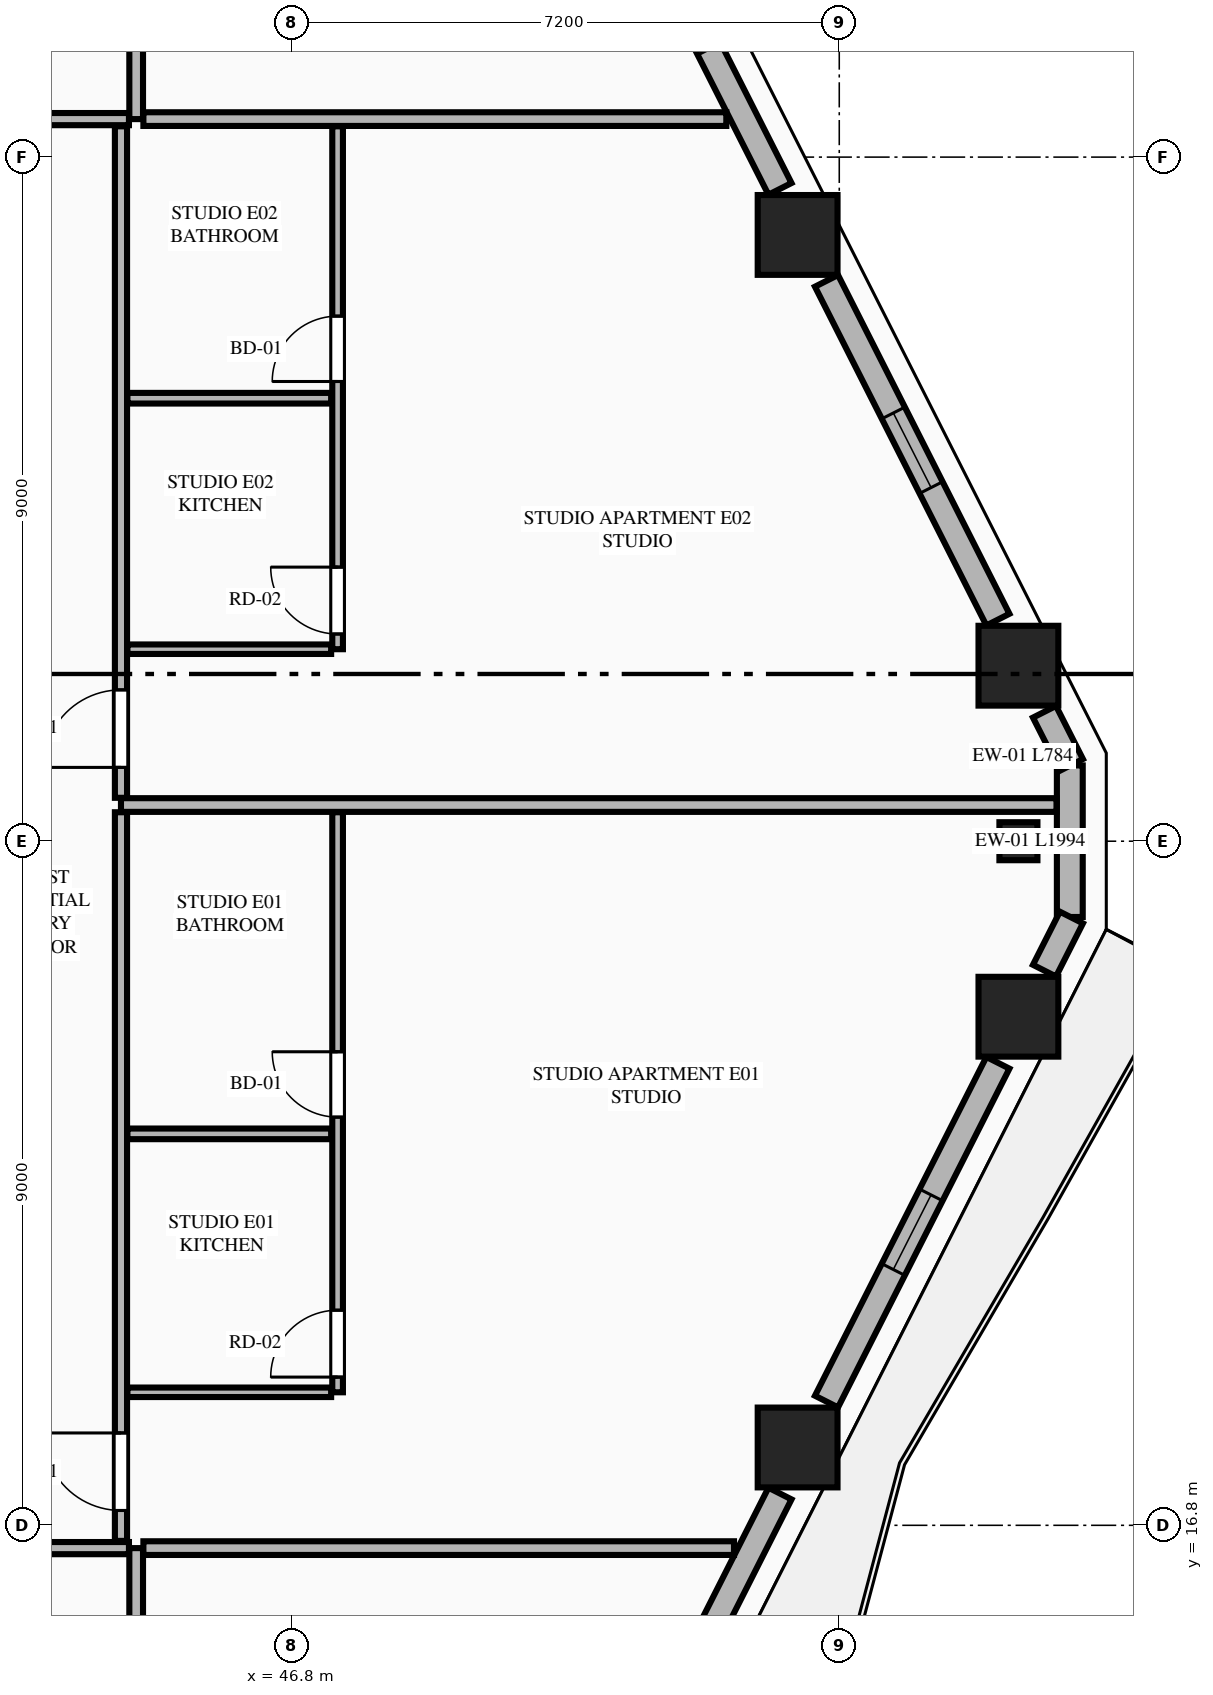
"""IFC4 building model, lengths in metres.
Left out: names, types, materials, properties, quantities, classifications, styles, units other than length and angle.
Written with IfcOpenShell. Run it as: python <this file> out.ifc"""

import sys

from ifc_helpers import new_model, si_unit, direction, frame, frame_2d, origin, origin_2d, place, context, subcontext, project, spatial, rectangle, extrude, element, fill, save


model = new_model("IFC4")
c1 = context("Model", 3, precision=1e-05, world=origin(), true_north=direction((0.0, 1.0)))
c2 = subcontext(c1, "Body", "Model", "MODEL_VIEW")
j1 = project(units=[si_unit("LENGTHUNIT", "METRE"), si_unit("PLANEANGLEUNIT", "RADIAN")], contexts=[c1])
p1 = place(None, origin())
s1 = spatial("IfcSite", under=j1, at=p1, CompositionType="ELEMENT")
p2 = place(p1, origin())
s2 = spatial("IfcBuilding", under=s1, at=p2, CompositionType="ELEMENT")
p3 = place(p2, frame((0.0, 0.0, 119.7)))
s3 = spatial("IfcBuildingStorey", under=s2, at=p3, CompositionType="ELEMENT", Elevation=119.7)
for number, where, z_axis, x_axis in (
    (1, (53.452, 17.824, 0.0), (0.0, 0.0, 1.0), (1.0, 0.0, 0.0)),
    (2, (56.357, 23.491, 0.0), (0.0, 0.0, 1.0), (1.0, 0.0, 0.0)),
    (3, (56.357, 28.109, 0.0), (0.0, 0.0, 1.0), (1.0, 0.0, 0.0)),
    (4, (53.452, 33.776, 0.0), (0.0, 0.0, 1.0), (1.0, 0.0, 0.0)),
):
    element("IfcColumn", number, at=place(p3, frame(where, z_axis=z_axis, x_axis=x_axis)), inside=s3, PredefinedType="COLUMN", context=c2, shape_type="SweptSolid", body=[
        extrude(rectangle(XDim=1.05, YDim=1.05, at=origin_2d()), origin(), (0.0, 0.0, 1.0), 3.55),
    ])
p4 = place(p3, frame((56.357, 25.8, 0.0), z_axis=(0.0, 0.0, 1.0), x_axis=(0.0, 1.0, 0.0)))
e5 = element("IfcColumn", 5, at=p4, inside=s3, PredefinedType="PILASTER", context=c2, shape_type="SweptSolid", body=[
    extrude(rectangle(XDim=0.5, YDim=0.35, at=origin_2d()), origin(), (0.0, 0.0, 1.0), 3.55),
])
p5 = place(p3, frame((57.033, 24.803, 0.0), z_axis=(0.0, 0.0, 1.0), x_axis=(0.0, 1.0, 0.0)))
e6 = element("IfcWall", 6, at=p5, inside=s3, PredefinedType="STANDARD", context=c2, shape_type="SweptSolid", body=[
    extrude(rectangle(XDim=1.994, YDim=0.34, at=frame_2d((0.997, 0.0))), origin(), (0.0, 0.0, 1.0), 3.34),
])
p6 = place(p3, frame((50.863, 12.561, 0.0), z_axis=(0.0, 0.0, 1.0), x_axis=(0.451567731634, 0.892236842855, 0.0)))
e7 = element("IfcWall", 7, at=p6, inside=s3, PredefinedType="STANDARD", context=c2, shape_type="SweptSolid", body=[
    extrude(rectangle(XDim=5.219, YDim=0.34, at=frame_2d((2.61, 0.0))), origin(), (0.0, 0.0, 1.0), 2.797),
])
p7 = place(p6, frame((1.532, 0.0, 0.0)))
e8 = element("IfcOpeningElement", 8, at=p7, cuts=e7, PredefinedType="OPENING", context=c2, shape_type="SweptSolid", body=[
    extrude(rectangle(XDim=1.1, YDim=2.25, at=frame_2d((0.55, 1.125))), frame((0.0, 0.18, 0.0), z_axis=(0.0, -1.0, 0.0), x_axis=(1.0, 0.0, 0.0)), (0.0, 0.0, 1.0), 0.36),
])
p8 = place(p3, frame((53.832, 18.428, 0.0), z_axis=(0.0, 0.0, 1.0), x_axis=(0.451431617681, 0.892305718102, 0.0)))
e9 = element("IfcWall", 9, at=p8, inside=s3, PredefinedType="STANDARD", context=c2, shape_type="SweptSolid", body=[
    extrude(rectangle(XDim=4.995, YDim=0.34, at=frame_2d((2.498, 0.0))), origin(), (0.0, 0.0, 1.0), 2.797),
])
p9 = place(p8, frame((1.947, 0.0, 0.75)))
e10 = element("IfcOpeningElement", 10, at=p9, cuts=e9, PredefinedType="OPENING", context=c2, shape_type="SweptSolid", body=[
    extrude(rectangle(XDim=1.1, YDim=1.897, at=frame_2d((0.55, 0.948))), frame((0.0, 0.18, 0.0), z_axis=(0.0, -1.0, 0.0), x_axis=(1.0, 0.0, 0.0)), (0.0, 0.0, 1.0), 0.36),
])
for number, where, z_axis, x_axis in (
    (11, (56.7, 24.097, 0.0), (0.0, 0.0, 1.0), (0.452, 0.892, 0.0)),
    (12, (57.054, 26.804, 0.0), (0.0, 0.0, 1.0), (-0.452, 0.892, 0.0)),
):
    element("IfcWall", number, at=place(p3, frame(where, z_axis=z_axis, x_axis=x_axis)), inside=s3, PredefinedType="STANDARD", context=c2, shape_type="SweptSolid", body=[
        extrude(rectangle(XDim=0.783, YDim=0.34, at=frame_2d((0.392, 0.0))), origin(), (0.0, 0.0, 1.0), 3.34),
    ])
p10 = place(p3, frame((56.087, 28.715, 0.0), z_axis=(0.0, 0.0, 1.0), x_axis=(-0.451431617681, 0.892305718102, 0.0)))
e13 = element("IfcWall", 13, at=p10, inside=s3, PredefinedType="STANDARD", context=c2, shape_type="SweptSolid", body=[
    extrude(rectangle(XDim=4.995, YDim=0.34, at=frame_2d((2.498, 0.0))), origin(), (0.0, 0.0, 1.0), 2.797),
])
p11 = place(p10, frame((1.947, 0.0, 0.75)))
e14 = element("IfcOpeningElement", 14, at=p11, cuts=e13, PredefinedType="OPENING", context=c2, shape_type="SweptSolid", body=[
    extrude(rectangle(XDim=1.1, YDim=1.897, at=frame_2d((0.55, 0.948))), frame((0.0, 0.18, 0.0), z_axis=(0.0, -1.0, 0.0), x_axis=(1.0, 0.0, 0.0)), (0.0, 0.0, 1.0), 0.36),
])
p12 = place(p3, frame((53.22, 34.382, 0.0), z_axis=(0.0, 0.0, 1.0), x_axis=(-0.451567731634, 0.892236842855, 0.0)))
e15 = element("IfcWall", 15, at=p12, inside=s3, PredefinedType="STANDARD", context=c2, shape_type="SweptSolid", body=[
    extrude(rectangle(XDim=5.219, YDim=0.34, at=frame_2d((2.61, 0.0))), origin(), (0.0, 0.0, 1.0), 2.797),
])
p13 = place(p12, frame((2.06, 0.0, 0.75)))
e16 = element("IfcOpeningElement", 16, at=p13, cuts=e15, PredefinedType="OPENING", context=c2, shape_type="SweptSolid", body=[
    extrude(rectangle(XDim=1.1, YDim=1.897, at=frame_2d((0.55, 0.948))), frame((0.0, 0.18, 0.0), z_axis=(0.0, -1.0, 0.0), x_axis=(1.0, 0.0, 0.0)), (0.0, 0.0, 1.0), 0.36),
])
p14 = place(p3, frame((44.75, 4.105, 0.0), z_axis=(0.0, 0.0, 1.0), x_axis=(0.0, 1.0, 0.0)))
e17 = element("IfcWall", 17, at=p14, inside=s3, PredefinedType="PARTITIONING", context=c2, shape_type="SweptSolid", body=[
    extrude(rectangle(XDim=12.395, YDim=0.18, at=frame_2d((6.198, 0.0))), origin(), (0.0, 0.0, 1.0), 3.34),
])
p15 = place(p3, frame((20.145, 16.5, 0.0), z_axis=(0.0, 0.0, 1.0), x_axis=(1.0, 0.0, 0.0)))
e18 = element("IfcWall", 18, at=p15, inside=s3, PredefinedType="PARTITIONING", context=c2, shape_type="SweptSolid", body=[
    extrude(rectangle(XDim=24.51, YDim=0.16, at=frame_2d((12.255, 0.0))), origin(), (0.0, 0.0, 1.0), 3.34),
])
p16 = place(p15, frame((0.405, 0.0, 0.0)))
e19 = element("IfcOpeningElement", 19, at=p16, cuts=e18, PredefinedType="OPENING", context=c2, shape_type="SweptSolid", body=[
    extrude(rectangle(XDim=1.35, YDim=2.35, at=frame_2d((0.675, 1.175))), frame((0.0, 0.09, 0.0), z_axis=(0.0, -1.0, 0.0), x_axis=(1.0, 0.0, 0.0)), (0.0, 0.0, 1.0), 0.18),
])
p17 = place(p3, frame((44.75, 35.3, 0.0), z_axis=(0.0, 0.0, 1.0), x_axis=(0.0, 1.0, 0.0)))
e20 = element("IfcWall", 20, at=p17, inside=s3, PredefinedType="PARTITIONING", context=c2, shape_type="SweptSolid", body=[
    extrude(rectangle(XDim=12.195, YDim=0.18, at=frame_2d((6.098, 0.0))), origin(), (0.0, 0.0, 1.0), 3.34),
])
p18 = place(p3, frame((20.145, 35.3, 0.0), z_axis=(0.0, 0.0, 1.0), x_axis=(1.0, 0.0, 0.0)))
e21 = element("IfcWall", 21, at=p18, inside=s3, PredefinedType="PARTITIONING", context=c2, shape_type="SweptSolid", body=[
    extrude(rectangle(XDim=24.51, YDim=0.16, at=frame_2d((12.255, 0.0))), origin(), (0.0, 0.0, 1.0), 3.34),
])
p19 = place(p18, frame((0.405, 0.0, 0.0)))
e22 = element("IfcOpeningElement", 22, at=p19, cuts=e21, PredefinedType="OPENING", context=c2, shape_type="SweptSolid", body=[
    extrude(rectangle(XDim=1.02, YDim=2.25, at=frame_2d((0.51, 1.125))), frame((0.0, 0.09, 0.0), z_axis=(0.0, -1.0, 0.0), x_axis=(1.0, 0.0, 0.0)), (0.0, 0.0, 1.0), 0.18),
])
p20 = place(p3, frame((44.845, 16.5, 0.0), z_axis=(0.0, 0.0, 1.0), x_axis=(1.0, 0.0, 0.0)))
e23 = element("IfcWall", 23, at=p20, inside=s3, PredefinedType="PARTITIONING", context=c2, shape_type="SweptSolid", body=[
    extrude(rectangle(XDim=7.77, YDim=0.18, at=frame_2d((3.885, 0.0))), origin(), (0.0, 0.0, 1.0), 3.34),
])
p21 = place(p3, frame((44.845, 35.3, 0.0), z_axis=(0.0, 0.0, 1.0), x_axis=(1.0, 0.0, 0.0)))
e24 = element("IfcWall", 24, at=p21, inside=s3, PredefinedType="PARTITIONING", context=c2, shape_type="SweptSolid", body=[
    extrude(rectangle(XDim=7.669, YDim=0.18, at=frame_2d((3.834, 0.0))), origin(), (0.0, 0.0, 1.0), 3.34),
])
p22 = place(p3, frame((44.55, 16.595, 0.0), z_axis=(0.0, 0.0, 1.0), x_axis=(0.0, 1.0, 0.0)))
e25 = element("IfcWall", 25, at=p22, inside=s3, PredefinedType="PARTITIONING", context=c2, shape_type="SweptSolid", body=[
    extrude(rectangle(XDim=9.586, YDim=0.16, at=frame_2d((4.793, 0.0))), origin(), (0.0, 0.0, 1.0), 3.34),
])
p23 = place(p22, frame((0.4, 0.0, 0.0)))
e26 = element("IfcOpeningElement", 26, at=p23, cuts=e25, PredefinedType="OPENING", context=c2, shape_type="SweptSolid", body=[
    extrude(rectangle(XDim=1.02, YDim=2.25, at=frame_2d((0.51, 1.125))), frame((0.0, 0.09, 0.0), z_axis=(0.0, -1.0, 0.0), x_axis=(1.0, 0.0, 0.0)), (0.0, 0.0, 1.0), 0.18),
])
p24 = place(p3, frame((44.635, 18.55, 0.0), z_axis=(0.0, 0.0, 1.0), x_axis=(1.0, 0.0, 0.0)))
e27 = element("IfcWall", 27, at=p24, inside=s3, PredefinedType="PARTITIONING", context=c2, shape_type="SweptSolid", body=[
    extrude(rectangle(XDim=2.68, YDim=0.125, at=frame_2d((1.34, 0.0))), origin(), (0.0, 0.0, 1.0), 2.722),
])
p25 = place(p3, frame((47.4, 18.55, 0.0), z_axis=(0.0, 0.0, 1.0), x_axis=(0.0, 1.0, 0.0)))
e28 = element("IfcWall", 28, at=p25, inside=s3, PredefinedType="PLUMBINGWALL", context=c2, shape_type="SweptSolid", body=[
    extrude(rectangle(XDim=7.631, YDim=0.14, at=frame_2d((3.815, 0.0))), origin(), (0.0, 0.0, 1.0), 3.34),
])
p26 = place(p25, frame((3.62, 0.0, 0.0)))
e29 = element("IfcOpeningElement", 29, at=p26, cuts=e28, PredefinedType="OPENING", context=c2, shape_type="SweptSolid", body=[
    extrude(rectangle(XDim=0.86, YDim=2.1, at=frame_2d((0.43, 1.05))), frame((0.0, 0.08, 0.0), z_axis=(0.0, -1.0, 0.0), x_axis=(1.0, 0.0, 0.0)), (0.0, 0.0, 1.0), 0.16),
])
p27 = place(p25, frame((0.2, 0.0, 0.0)))
e30 = element("IfcOpeningElement", 30, at=p27, cuts=e28, PredefinedType="OPENING", context=c2, shape_type="SweptSolid", body=[
    extrude(rectangle(XDim=0.88, YDim=2.15, at=frame_2d((0.44, 1.075))), frame((0.0, 0.08, 0.0), z_axis=(0.0, -1.0, 0.0), x_axis=(1.0, 0.0, 0.0)), (0.0, 0.0, 1.0), 0.16),
])
p28 = place(p3, frame((44.635, 21.95, 0.0), z_axis=(0.0, 0.0, 1.0), x_axis=(1.0, 0.0, 0.0)))
e31 = element("IfcWall", 31, at=p28, inside=s3, PredefinedType="PLUMBINGWALL", context=c2, shape_type="SweptSolid", body=[
    extrude(rectangle(XDim=2.68, YDim=0.14, at=frame_2d((1.34, 0.0))), origin(), (0.0, 0.0, 1.0), 3.34),
])
p29 = place(p3, frame((44.55, 26.276, 0.0), z_axis=(0.0, 0.0, 1.0), x_axis=(1.0, 0.0, 0.0)))
e32 = element("IfcWall", 32, at=p29, inside=s3, PredefinedType="PARTITIONING", context=c2, shape_type="SweptSolid", body=[
    extrude(rectangle(XDim=12.308, YDim=0.18, at=frame_2d((6.154, 0.0))), origin(), (0.0, 0.0, 1.0), 3.34),
])
p30 = place(p3, frame((44.55, 26.371, 0.0), z_axis=(0.0, 0.0, 1.0), x_axis=(0.0, 1.0, 0.0)))
e33 = element("IfcWall", 33, at=p30, inside=s3, PredefinedType="PARTITIONING", context=c2, shape_type="SweptSolid", body=[
    extrude(rectangle(XDim=8.834, YDim=0.16, at=frame_2d((4.417, 0.0))), origin(), (0.0, 0.0, 1.0), 3.34),
])
p31 = place(p30, frame((0.4, 0.0, 0.0)))
e34 = element("IfcOpeningElement", 34, at=p31, cuts=e33, PredefinedType="OPENING", context=c2, shape_type="SweptSolid", body=[
    extrude(rectangle(XDim=1.02, YDim=2.25, at=frame_2d((0.51, 1.125))), frame((0.0, 0.09, 0.0), z_axis=(0.0, -1.0, 0.0), x_axis=(1.0, 0.0, 0.0)), (0.0, 0.0, 1.0), 0.18),
])
p32 = place(p3, frame((44.635, 28.326, 0.0), z_axis=(0.0, 0.0, 1.0), x_axis=(1.0, 0.0, 0.0)))
e35 = element("IfcWall", 35, at=p32, inside=s3, PredefinedType="PARTITIONING", context=c2, shape_type="SweptSolid", body=[
    extrude(rectangle(XDim=2.68, YDim=0.125, at=frame_2d((1.34, 0.0))), origin(), (0.0, 0.0, 1.0), 3.34),
])
p33 = place(p3, frame((47.4, 28.326, 0.0), z_axis=(0.0, 0.0, 1.0), x_axis=(0.0, 1.0, 0.0)))
e36 = element("IfcWall", 36, at=p33, inside=s3, PredefinedType="PLUMBINGWALL", context=c2, shape_type="SweptSolid", body=[
    extrude(rectangle(XDim=6.879, YDim=0.14, at=frame_2d((3.439, 0.0))), origin(), (0.0, 0.0, 1.0), 3.34),
])
p34 = place(p33, frame((3.522, 0.0, 0.0)))
e37 = element("IfcOpeningElement", 37, at=p34, cuts=e36, PredefinedType="OPENING", context=c2, shape_type="SweptSolid", body=[
    extrude(rectangle(XDim=0.86, YDim=2.1, at=frame_2d((0.43, 1.05))), frame((0.0, 0.08, 0.0), z_axis=(0.0, -1.0, 0.0), x_axis=(1.0, 0.0, 0.0)), (0.0, 0.0, 1.0), 0.16),
])
p35 = place(p33, frame((0.2, 0.0, 0.0)))
e38 = element("IfcOpeningElement", 38, at=p35, cuts=e36, PredefinedType="OPENING", context=c2, shape_type="SweptSolid", body=[
    extrude(rectangle(XDim=0.88, YDim=2.15, at=frame_2d((0.44, 1.075))), frame((0.0, 0.08, 0.0), z_axis=(0.0, -1.0, 0.0), x_axis=(1.0, 0.0, 0.0)), (0.0, 0.0, 1.0), 0.16),
])
p36 = place(p3, frame((44.635, 31.628, 0.0), z_axis=(0.0, 0.0, 1.0), x_axis=(1.0, 0.0, 0.0)))
e39 = element("IfcWall", 39, at=p36, inside=s3, PredefinedType="PLUMBINGWALL", context=c2, shape_type="SweptSolid", body=[
    extrude(rectangle(XDim=2.68, YDim=0.14, at=frame_2d((1.34, 0.0))), origin(), (0.0, 0.0, 1.0), 3.34),
])
p37 = place(p9, origin())
e40 = element("IfcWindow", 40, at=p37, inside=s3, PartitioningType="SINGLE_PANEL", PredefinedType="WINDOW", context=c2, shape_type="SweptSolid", body=[
    extrude(rectangle(XDim=1.1, YDim=1.897, at=frame_2d((0.55, 0.948))), frame((0.0, 0.03, 0.0), z_axis=(0.0, -1.0, 0.0), x_axis=(1.0, 0.0, 0.0)), (0.0, 0.0, 1.0), 0.06),
])
fill(e10, e40)
p38 = place(p11, origin())
e41 = element("IfcWindow", 41, at=p38, inside=s3, PartitioningType="SINGLE_PANEL", PredefinedType="WINDOW", context=c2, shape_type="SweptSolid", body=[
    extrude(rectangle(XDim=1.1, YDim=1.897, at=frame_2d((0.55, 0.948))), frame((0.0, 0.03, 0.0), z_axis=(0.0, -1.0, 0.0), x_axis=(1.0, 0.0, 0.0)), (0.0, 0.0, 1.0), 0.06),
])
fill(e14, e41)
p39 = place(p26, origin())
e42 = element("IfcDoor", 42, at=p39, inside=s3, OperationType="SINGLE_SWING_RIGHT", PredefinedType="DOOR", context=c2, shape_type="SweptSolid", body=[
    extrude(rectangle(XDim=0.86, YDim=2.1, at=frame_2d((0.43, 1.05))), frame((0.0, 0.025, 0.0), z_axis=(0.0, -1.0, 0.0), x_axis=(1.0, 0.0, 0.0)), (0.0, 0.0, 1.0), 0.05),
])
fill(e29, e42)
p40 = place(p23, origin())
e43 = element("IfcDoor", 43, at=p40, inside=s3, OperationType="SINGLE_SWING_RIGHT", PredefinedType="DOOR", context=c2, shape_type="SweptSolid", body=[
    extrude(rectangle(XDim=1.02, YDim=2.25, at=frame_2d((0.51, 1.125))), frame((0.0, 0.025, 0.0), z_axis=(0.0, -1.0, 0.0), x_axis=(1.0, 0.0, 0.0)), (0.0, 0.0, 1.0), 0.05),
])
fill(e26, e43)
p41 = place(p27, origin())
e44 = element("IfcDoor", 44, at=p41, inside=s3, OperationType="SINGLE_SWING_LEFT", PredefinedType="DOOR", context=c2, shape_type="SweptSolid", body=[
    extrude(rectangle(XDim=0.88, YDim=2.15, at=frame_2d((0.44, 1.075))), frame((0.0, 0.025, 0.0), z_axis=(0.0, -1.0, 0.0), x_axis=(1.0, 0.0, 0.0)), (0.0, 0.0, 1.0), 0.05),
])
fill(e30, e44)
p42 = place(p34, origin())
e45 = element("IfcDoor", 45, at=p42, inside=s3, OperationType="SINGLE_SWING_LEFT", PredefinedType="DOOR", context=c2, shape_type="SweptSolid", body=[
    extrude(rectangle(XDim=0.86, YDim=2.1, at=frame_2d((0.43, 1.05))), frame((0.0, 0.025, 0.0), z_axis=(0.0, -1.0, 0.0), x_axis=(1.0, 0.0, 0.0)), (0.0, 0.0, 1.0), 0.05),
])
fill(e37, e45)
p43 = place(p31, origin())
e46 = element("IfcDoor", 46, at=p43, inside=s3, OperationType="SINGLE_SWING_LEFT", PredefinedType="DOOR", context=c2, shape_type="SweptSolid", body=[
    extrude(rectangle(XDim=1.02, YDim=2.25, at=frame_2d((0.51, 1.125))), frame((0.0, 0.025, 0.0), z_axis=(0.0, -1.0, 0.0), x_axis=(1.0, 0.0, 0.0)), (0.0, 0.0, 1.0), 0.05),
])
fill(e34, e46)
p44 = place(p35, origin())
e47 = element("IfcDoor", 47, at=p44, inside=s3, OperationType="SINGLE_SWING_RIGHT", PredefinedType="DOOR", context=c2, shape_type="SweptSolid", body=[
    extrude(rectangle(XDim=0.88, YDim=2.15, at=frame_2d((0.44, 1.075))), frame((0.0, 0.025, 0.0), z_axis=(0.0, -1.0, 0.0), x_axis=(1.0, 0.0, 0.0)), (0.0, 0.0, 1.0), 0.05),
])
fill(e38, e47)
save(model, sys.argv[1])
